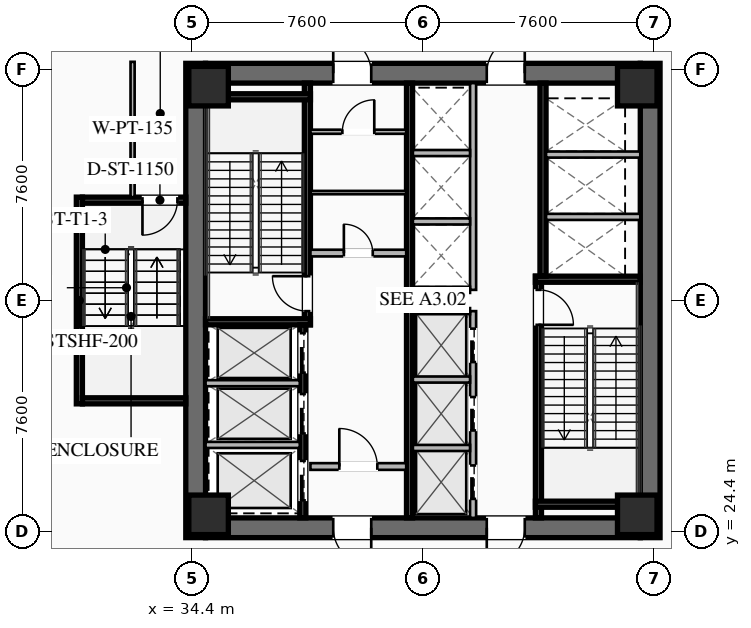
"""IFC4 building model, lengths in metres.
Left out: names, types, materials, properties, quantities, classifications, styles, units other than length and angle.
Written with IfcOpenShell. Run it as: python <this file> out.ifc"""

import sys

from ifc_helpers import new_model, si_unit, direction, frame, frame_2d, origin, origin_2d, place, context, subcontext, project, spatial, rectangle, hollow_rectangle, extrude, element, fill, save


model = new_model("IFC4")
c1 = context("Model", 3, precision=1e-05, world=origin(), true_north=direction((0.0, 1.0)))
c2 = subcontext(c1, "Body", "Model", "MODEL_VIEW")
j1 = project(units=[si_unit("LENGTHUNIT", "METRE"), si_unit("PLANEANGLEUNIT", "RADIAN")], contexts=[c1])
p1 = place(None, origin())
s1 = spatial("IfcSite", under=j1, at=p1, CompositionType="ELEMENT")
p2 = place(p1, origin())
s2 = spatial("IfcBuilding", under=s1, at=p2, CompositionType="ELEMENT")
p3 = place(p2, frame((0.0, 0.0, 10.2)))
s3 = spatial("IfcBuildingStorey", under=s2, at=p3, CompositionType="ELEMENT", Elevation=10.2)
for number, where, z_axis, x_axis in (
    (1, (34.525, 24.2, 0.0), (0.0, 0.0, 1.0), (0.0, 1.0, 0.0)),
    (2, (49.475, 39.8, 0.0), (0.0, 0.0, 1.0), (0.0, -1.0, 0.0)),
):
    element("IfcWall", number, at=place(p3, frame(where, z_axis=z_axis, x_axis=x_axis)), inside=s3, PredefinedType="SHEAR", context=c2, shape_type="SweptSolid", body=[
        extrude(rectangle(XDim=15.6, YDim=0.65, at=frame_2d((7.8, 0.0))), origin(), (0.0, 0.0, 1.0), 5.4),
    ])
p4 = place(p3, frame((49.15, 24.525, 0.0), z_axis=(0.0, 0.0, 1.0), x_axis=(-1.0, 0.0, 0.0)))
e3 = element("IfcWall", 3, at=p4, inside=s3, PredefinedType="SHEAR", context=c2, shape_type="SweptSolid", body=[
    extrude(rectangle(XDim=14.3, YDim=0.65, at=frame_2d((7.15, 0.0))), origin(), (0.0, 0.0, 1.0), 5.4),
])
p5 = place(p4, frame((8.85, 0.0, 0.0)))
e4 = element("IfcOpeningElement", 4, at=p5, cuts=e3, PredefinedType="OPENING", context=c2, shape_type="SweptSolid", body=[
    extrude(rectangle(XDim=1.25, YDim=2.25, at=frame_2d((0.625, 1.125))), frame((0.0, 0.335, 0.0), z_axis=(0.0, -1.0, 0.0), x_axis=(1.0, 0.0, 0.0)), (0.0, 0.0, 1.0), 0.67),
])
p6 = place(p4, frame((3.8, 0.0, 0.0)))
e5 = element("IfcOpeningElement", 5, at=p6, cuts=e3, PredefinedType="OPENING", context=c2, shape_type="SweptSolid", body=[
    extrude(rectangle(XDim=1.25, YDim=2.25, at=frame_2d((0.625, 1.125))), frame((0.0, 0.335, 0.0), z_axis=(0.0, -1.0, 0.0), x_axis=(1.0, 0.0, 0.0)), (0.0, 0.0, 1.0), 0.67),
])
p7 = place(p3, frame((34.85, 39.475, 0.0), z_axis=(0.0, 0.0, 1.0), x_axis=(1.0, 0.0, 0.0)))
e6 = element("IfcWall", 6, at=p7, inside=s3, PredefinedType="SHEAR", context=c2, shape_type="SweptSolid", body=[
    extrude(rectangle(XDim=14.3, YDim=0.65, at=frame_2d((7.15, 0.0))), origin(), (0.0, 0.0, 1.0), 5.4),
])
p8 = place(p7, frame((4.2, 0.0, 0.0)))
e7 = element("IfcOpeningElement", 7, at=p8, cuts=e6, PredefinedType="OPENING", context=c2, shape_type="SweptSolid", body=[
    extrude(rectangle(XDim=1.25, YDim=2.25, at=frame_2d((0.625, 1.125))), frame((0.0, 0.335, 0.0), z_axis=(0.0, -1.0, 0.0), x_axis=(1.0, 0.0, 0.0)), (0.0, 0.0, 1.0), 0.67),
])
p9 = place(p7, frame((9.25, 0.0, 0.0)))
e8 = element("IfcOpeningElement", 8, at=p9, cuts=e6, PredefinedType="OPENING", context=c2, shape_type="SweptSolid", body=[
    extrude(rectangle(XDim=1.25, YDim=2.25, at=frame_2d((0.625, 1.125))), frame((0.0, 0.335, 0.0), z_axis=(0.0, -1.0, 0.0), x_axis=(1.0, 0.0, 0.0)), (0.0, 0.0, 1.0), 0.67),
])
for number, where, z_axis, x_axis in (
    (9, (34.95, 24.95, 0.0), (0.0, 0.0, 1.0), (1.0, 0.0, 0.0)),
    (10, (49.05, 24.95, 0.0), (0.0, 0.0, 1.0), (1.0, 0.0, 0.0)),
    (11, (49.05, 39.05, 0.0), (0.0, 0.0, 1.0), (1.0, 0.0, 0.0)),
    (12, (34.95, 39.05, 0.0), (0.0, 0.0, 1.0), (1.0, 0.0, 0.0)),
):
    element("IfcColumn", number, at=place(p3, frame(where, z_axis=z_axis, x_axis=x_axis)), inside=s3, PredefinedType="COLUMN", context=c2, shape_type="SweptSolid", body=[
        extrude(hollow_rectangle(XDim=1.3, YDim=1.3, WallThickness=0.05, at=origin_2d()), origin(), (0.0, 0.0, 1.0), 5.14),
    ])
p10 = place(p3, frame((38.2, 31.2, 0.0), z_axis=(0.0, 0.0, 1.0), x_axis=(0.0, 1.0, 0.0)))
e13 = element("IfcWall", 13, at=p10, inside=s3, PredefinedType="SHEAR", context=c2, shape_type="SweptSolid", body=[
    extrude(rectangle(XDim=7.95, YDim=0.2, at=frame_2d((3.975, 0.0))), origin(), (0.0, 0.0, 1.0), 5.14),
])
p11 = place(p10, frame((0.45, 0.0, 0.0)))
e14 = element("IfcOpeningElement", 14, at=p11, cuts=e13, PredefinedType="OPENING", context=c2, shape_type="SweptSolid", body=[
    extrude(rectangle(XDim=1.15, YDim=2.2, at=frame_2d((0.575, 1.1))), frame((0.0, 0.11, 0.0), z_axis=(0.0, -1.0, 0.0), x_axis=(1.0, 0.0, 0.0)), (0.0, 0.0, 1.0), 0.22),
])
for number, where, z_axis, x_axis in (
    (15, (34.85, 31.3, 0.0), (0.0, 0.0, 1.0), (1.0, 0.0, 0.0)),
    (16, (34.85, 38.7, 0.0), (0.0, 0.0, 1.0), (1.0, 0.0, 0.0)),
):
    element("IfcWall", number, at=place(p3, frame(where, z_axis=z_axis, x_axis=x_axis)), inside=s3, PredefinedType="SHEAR", context=c2, shape_type="SweptSolid", body=[
        extrude(rectangle(XDim=3.45, YDim=0.2, at=frame_2d((1.725, 0.0))), origin(), (0.0, 0.0, 1.0), 5.14),
    ])
p12 = place(p3, frame((45.8, 32.8, 0.0), z_axis=(0.0, 0.0, 1.0), x_axis=(0.0, -1.0, 0.0)))
e17 = element("IfcWall", 17, at=p12, inside=s3, PredefinedType="SHEAR", context=c2, shape_type="SweptSolid", body=[
    extrude(rectangle(XDim=7.95, YDim=0.2, at=frame_2d((3.975, 0.0))), origin(), (0.0, 0.0, 1.0), 5.14),
])
p13 = place(p12, frame((0.45, 0.0, 0.0)))
e18 = element("IfcOpeningElement", 18, at=p13, cuts=e17, PredefinedType="OPENING", context=c2, shape_type="SweptSolid", body=[
    extrude(rectangle(XDim=1.15, YDim=2.2, at=frame_2d((0.575, 1.1))), frame((0.0, 0.11, 0.0), z_axis=(0.0, -1.0, 0.0), x_axis=(1.0, 0.0, 0.0)), (0.0, 0.0, 1.0), 0.22),
])
for number, where, z_axis, x_axis in (
    (19, (45.7, 32.7, 0.0), (0.0, 0.0, 1.0), (1.0, 0.0, 0.0)),
    (20, (45.7, 25.3, 0.0), (0.0, 0.0, 1.0), (1.0, 0.0, 0.0)),
):
    element("IfcWall", number, at=place(p3, frame(where, z_axis=z_axis, x_axis=x_axis)), inside=s3, PredefinedType="SHEAR", context=c2, shape_type="SweptSolid", body=[
        extrude(rectangle(XDim=3.45, YDim=0.2, at=frame_2d((1.725, 0.0))), origin(), (0.0, 0.0, 1.0), 5.14),
    ])
p14 = place(p3, frame((41.56, 24.85, 0.0), z_axis=(0.0, 0.0, 1.0), x_axis=(0.0, 1.0, 0.0)))
e21 = element("IfcWall", 21, at=p14, inside=s3, PredefinedType="SHEAR", context=c2, shape_type="SweptSolid", body=[
    extrude(rectangle(XDim=14.3, YDim=0.2, at=frame_2d((7.15, 0.0))), origin(), (0.0, 0.0, 1.0), 5.14),
])
p15 = place(p3, frame((38.3, 33.56, 0.0), z_axis=(0.0, 0.0, 1.0), x_axis=(1.0, 0.0, 0.0)))
e22 = element("IfcWall", 22, at=p15, inside=s3, PredefinedType="SOLIDWALL", context=c2, shape_type="SweptSolid", body=[
    extrude(rectangle(XDim=3.15, YDim=0.22, at=frame_2d((1.575, 0.0))), origin(), (0.0, 0.0, 1.0), 2.71),
])
p16 = place(p15, frame((1.1, 0.0, 0.0)))
e23 = element("IfcOpeningElement", 23, at=p16, cuts=e22, PredefinedType="OPENING", context=c2, shape_type="SweptSolid", body=[
    extrude(rectangle(XDim=0.95, YDim=2.05, at=frame_2d((0.475, 1.025))), frame((0.0, 0.12, 0.0), z_axis=(0.0, -1.0, 0.0), x_axis=(1.0, 0.0, 0.0)), (0.0, 0.0, 1.0), 0.24),
])
p17 = place(p3, frame((38.3, 26.54, 0.0), z_axis=(0.0, 0.0, 1.0), x_axis=(1.0, 0.0, 0.0)))
e24 = element("IfcWall", 24, at=p17, inside=s3, PredefinedType="SOLIDWALL", context=c2, shape_type="SweptSolid", body=[
    extrude(rectangle(XDim=3.15, YDim=0.22, at=frame_2d((1.575, 0.0))), origin(), (0.0, 0.0, 1.0), 2.71),
])
p18 = place(p17, frame((0.95, 0.0, 0.0)))
e25 = element("IfcOpeningElement", 25, at=p18, cuts=e24, PredefinedType="OPENING", context=c2, shape_type="SweptSolid", body=[
    extrude(rectangle(XDim=1.25, YDim=2.25, at=frame_2d((0.625, 1.125))), frame((0.0, 0.12, 0.0), z_axis=(0.0, -1.0, 0.0), x_axis=(1.0, 0.0, 0.0)), (0.0, 0.0, 1.0), 0.24),
])
p19 = place(p3, frame((38.05, 24.85, 0.0), z_axis=(0.0, 0.0, 1.0), x_axis=(0.0, 1.0, 0.0)))
e26 = element("IfcWall", 26, at=p19, inside=s3, PredefinedType="SHEAR", context=c2, shape_type="SweptSolid", body=[
    extrude(rectangle(XDim=6.35, YDim=0.2, at=frame_2d((3.175, 0.0))), origin(), (0.0, 0.0, 1.0), 5.14),
])
p20 = place(p19, frame((4.775, 0.0, 0.0)))
e27 = element("IfcOpeningElement", 27, at=p20, cuts=e26, PredefinedType="OPENING", context=c2, shape_type="SweptSolid", body=[
    extrude(rectangle(XDim=1.3, YDim=2.25, at=frame_2d((0.65, 1.125))), frame((0.0, 0.11, 0.0), z_axis=(0.0, -1.0, 0.0), x_axis=(1.0, 0.0, 0.0)), (0.0, 0.0, 1.0), 0.22),
])
p21 = place(p19, frame((2.775, 0.0, 0.0)))
e28 = element("IfcOpeningElement", 28, at=p21, cuts=e26, PredefinedType="OPENING", context=c2, shape_type="SweptSolid", body=[
    extrude(rectangle(XDim=1.3, YDim=2.25, at=frame_2d((0.65, 1.125))), frame((0.0, 0.11, 0.0), z_axis=(0.0, -1.0, 0.0), x_axis=(1.0, 0.0, 0.0)), (0.0, 0.0, 1.0), 0.22),
])
p22 = place(p19, frame((0.575, 0.0, 0.0)))
e29 = element("IfcOpeningElement", 29, at=p22, cuts=e26, PredefinedType="OPENING", context=c2, shape_type="SweptSolid", body=[
    extrude(rectangle(XDim=1.3, YDim=2.25, at=frame_2d((0.65, 1.125))), frame((0.0, 0.11, 0.0), z_axis=(0.0, -1.0, 0.0), x_axis=(1.0, 0.0, 0.0)), (0.0, 0.0, 1.0), 0.22),
])
for number, where, z_axis, x_axis in (
    (30, (34.85, 27.25, 0.0), (0.0, 0.0, 1.0), (1.0, 0.0, 0.0)),
    (31, (34.85, 29.28, 0.0), (0.0, 0.0, 1.0), (1.0, 0.0, 0.0)),
):
    element("IfcWall", number, at=place(p3, frame(where, z_axis=z_axis, x_axis=x_axis)), inside=s3, PredefinedType="SOLIDWALL", context=c2, shape_type="SweptSolid", body=[
        extrude(rectangle(XDim=3.1, YDim=0.2, at=frame_2d((1.55, 0.0))), origin(), (0.0, 0.0, 1.0), 5.14),
    ])
p23 = place(p3, frame((45.95, 39.15, 0.0), z_axis=(0.0, 0.0, 1.0), x_axis=(0.0, -1.0, 0.0)))
e32 = element("IfcWall", 32, at=p23, inside=s3, PredefinedType="SHEAR", context=c2, shape_type="SweptSolid", body=[
    extrude(rectangle(XDim=6.35, YDim=0.2, at=frame_2d((3.175, 0.0))), origin(), (0.0, 0.0, 1.0), 5.14),
])
for number, where, z_axis, x_axis in (
    (33, (46.05, 34.75, 0.0), (0.0, 0.0, 1.0), (1.0, 0.0, 0.0)),
    (34, (46.05, 36.8, 0.0), (0.0, 0.0, 1.0), (1.0, 0.0, 0.0)),
):
    element("IfcWall", number, at=place(p3, frame(where, z_axis=z_axis, x_axis=x_axis)), inside=s3, PredefinedType="SOLIDWALL", context=c2, shape_type="SweptSolid", body=[
        extrude(rectangle(XDim=3.1, YDim=0.2, at=frame_2d((1.55, 0.0))), origin(), (0.0, 0.0, 1.0), 5.14),
    ])
p24 = place(p3, frame((38.3, 37.55, 0.0), z_axis=(0.0, 0.0, 1.0), x_axis=(1.0, 0.0, 0.0)))
e35 = element("IfcWall", 35, at=p24, inside=s3, PredefinedType="PARTITIONING", context=c2, shape_type="SweptSolid", body=[
    extrude(rectangle(XDim=3.15, YDim=0.135, at=frame_2d((1.575, 0.0))), origin(), (0.0, 0.0, 1.0), 2.71),
])
p25 = place(p24, frame((1.05, 0.0, 0.0)))
e36 = element("IfcOpeningElement", 36, at=p25, cuts=e35, PredefinedType="OPENING", context=c2, shape_type="SweptSolid", body=[
    extrude(rectangle(XDim=1.05, YDim=2.2, at=frame_2d((0.525, 1.1))), frame((0.0, 0.077, 0.0), z_axis=(0.0, -1.0, 0.0), x_axis=(1.0, 0.0, 0.0)), (0.0, 0.0, 1.0), 0.155),
])
p26 = place(p3, frame((38.3, 35.55, 0.0), z_axis=(0.0, 0.0, 1.0), x_axis=(1.0, 0.0, 0.0)))
e37 = element("IfcWall", 37, at=p26, inside=s3, PredefinedType="PARTITIONING", context=c2, shape_type="SweptSolid", body=[
    extrude(rectangle(XDim=3.15, YDim=0.11, at=frame_2d((1.575, 0.0))), origin(), (0.0, 0.0, 1.0), 2.71),
])
p27 = place(p3, frame((43.65, 24.85, 0.0), z_axis=(0.0, 0.0, 1.0), x_axis=(0.0, 1.0, 0.0)))
e38 = element("IfcWall", 38, at=p27, inside=s3, PredefinedType="SOLIDWALL", context=c2, shape_type="SweptSolid", body=[
    extrude(rectangle(XDim=6.8, YDim=0.2, at=frame_2d((3.4, 0.0))), origin(), (0.0, 0.0, 1.0), 5.14),
])
p28 = place(p27, frame((0.625, 0.0, 0.0)))
e39 = element("IfcOpeningElement", 39, at=p28, cuts=e38, PredefinedType="OPENING", context=c2, shape_type="SweptSolid", body=[
    extrude(rectangle(XDim=1.1, YDim=2.2, at=frame_2d((0.55, 1.1))), frame((0.0, 0.11, 0.0), z_axis=(0.0, -1.0, 0.0), x_axis=(1.0, 0.0, 0.0)), (0.0, 0.0, 1.0), 0.22),
])
p29 = place(p27, frame((2.875, 0.0, 0.0)))
e40 = element("IfcOpeningElement", 40, at=p29, cuts=e38, PredefinedType="OPENING", context=c2, shape_type="SweptSolid", body=[
    extrude(rectangle(XDim=1.1, YDim=2.2, at=frame_2d((0.55, 1.1))), frame((0.0, 0.11, 0.0), z_axis=(0.0, -1.0, 0.0), x_axis=(1.0, 0.0, 0.0)), (0.0, 0.0, 1.0), 0.22),
])
p30 = place(p27, frame((5.125, 0.0, 0.0)))
e41 = element("IfcOpeningElement", 41, at=p30, cuts=e38, PredefinedType="OPENING", context=c2, shape_type="SweptSolid", body=[
    extrude(rectangle(XDim=1.1, YDim=2.2, at=frame_2d((0.55, 1.1))), frame((0.0, 0.11, 0.0), z_axis=(0.0, -1.0, 0.0), x_axis=(1.0, 0.0, 0.0)), (0.0, 0.0, 1.0), 0.22),
])
for number, where, z_axis, x_axis in (
    (42, (41.67, 27.15, 0.0), (0.0, 0.0, 1.0), (1.0, 0.0, 0.0)),
    (43, (41.67, 29.4, 0.0), (0.0, 0.0, 1.0), (1.0, 0.0, 0.0)),
    (44, (41.67, 31.65, 0.0), (0.0, 0.0, 1.0), (1.0, 0.0, 0.0)),
):
    element("IfcWall", number, at=place(p3, frame(where, z_axis=z_axis, x_axis=x_axis)), inside=s3, PredefinedType="SOLIDWALL", context=c2, shape_type="SweptSolid", body=[
        extrude(rectangle(XDim=1.88, YDim=0.2, at=frame_2d((0.94, 0.0))), origin(), (0.0, 0.0, 1.0), 5.14),
    ])
p31 = place(p3, frame((43.65, 32.35, 0.0), z_axis=(0.0, 0.0, 1.0), x_axis=(0.0, 1.0, 0.0)))
e45 = element("IfcWall", 45, at=p31, inside=s3, PredefinedType="SOLIDWALL", context=c2, shape_type="SweptSolid", body=[
    extrude(rectangle(XDim=6.8, YDim=0.2, at=frame_2d((3.4, 0.0))), origin(), (0.0, 0.0, 1.0), 5.14),
])
for number, where, z_axis, x_axis in (
    (46, (41.67, 32.35, 0.0), (0.0, 0.0, 1.0), (1.0, 0.0, 0.0)),
    (47, (41.67, 34.6, 0.0), (0.0, 0.0, 1.0), (1.0, 0.0, 0.0)),
    (48, (41.67, 36.85, 0.0), (0.0, 0.0, 1.0), (1.0, 0.0, 0.0)),
):
    element("IfcWall", number, at=place(p3, frame(where, z_axis=z_axis, x_axis=x_axis)), inside=s3, PredefinedType="SOLIDWALL", context=c2, shape_type="SweptSolid", body=[
        extrude(rectangle(XDim=1.88, YDim=0.2, at=frame_2d((0.94, 0.0))), origin(), (0.0, 0.0, 1.0), 5.14),
    ])
p32 = place(p3, frame((30.7, 28.6, 0.0), z_axis=(0.0, 0.0, 1.0), x_axis=(0.0, 1.0, 0.0)))
e49 = element("IfcWall", 49, at=p32, inside=s3, PredefinedType="SHEAR", context=c2, shape_type="SweptSolid", body=[
    extrude(rectangle(XDim=6.8, YDim=0.2, at=frame_2d((3.4, 0.0))), origin(), (0.0, 0.0, 1.0), 5.14),
])
p33 = place(p3, frame((34.2, 35.3, 0.0), z_axis=(0.0, 0.0, 1.0), x_axis=(-1.0, 0.0, 0.0)))
e50 = element("IfcWall", 50, at=p33, inside=s3, PredefinedType="SHEAR", context=c2, shape_type="SweptSolid", body=[
    extrude(rectangle(XDim=3.4, YDim=0.2, at=frame_2d((1.7, 0.0))), origin(), (0.0, 0.0, 1.0), 5.14),
])
p34 = place(p33, frame((0.275, 0.0, 0.0)))
e51 = element("IfcOpeningElement", 51, at=p34, cuts=e50, PredefinedType="OPENING", context=c2, shape_type="SweptSolid", body=[
    extrude(rectangle(XDim=1.15, YDim=2.2, at=frame_2d((0.575, 1.1))), frame((0.0, 0.11, 0.0), z_axis=(0.0, -1.0, 0.0), x_axis=(1.0, 0.0, 0.0)), (0.0, 0.0, 1.0), 0.22),
])
p35 = place(p3, frame((30.8, 28.7, 0.0), z_axis=(0.0, 0.0, 1.0), x_axis=(1.0, 0.0, 0.0)))
e52 = element("IfcWall", 52, at=p35, inside=s3, PredefinedType="SHEAR", context=c2, shape_type="SweptSolid", body=[
    extrude(rectangle(XDim=3.4, YDim=0.2, at=frame_2d((1.7, 0.0))), origin(), (0.0, 0.0, 1.0), 5.14),
])
p36 = place(p3, frame((32.45, 35.4, 0.0), z_axis=(0.0, 0.0, 1.0), x_axis=(0.0, 1.0, 0.0)))
e53 = element("IfcWall", 53, at=p36, inside=s3, PredefinedType="PARTITIONING", context=c2, shape_type="SweptSolid", body=[
    extrude(rectangle(XDim=4.45, YDim=0.135, at=frame_2d((2.225, 0.0))), origin(), (0.0, 0.0, 1.0), 2.71),
])
p37 = place(p8, origin())
e54 = element("IfcDoor", 54, at=p37, inside=s3, OperationType="SINGLE_SWING_LEFT", PredefinedType="DOOR", context=c2, shape_type="SweptSolid", body=[
    extrude(rectangle(XDim=1.25, YDim=2.25, at=frame_2d((0.625, 1.125))), frame((0.0, 0.025, 0.0), z_axis=(0.0, -1.0, 0.0), x_axis=(1.0, 0.0, 0.0)), (0.0, 0.0, 1.0), 0.05),
])
fill(e7, e54)
p38 = place(p9, origin())
e55 = element("IfcDoor", 55, at=p38, inside=s3, OperationType="SINGLE_SWING_RIGHT", PredefinedType="DOOR", context=c2, shape_type="SweptSolid", body=[
    extrude(rectangle(XDim=1.25, YDim=2.25, at=frame_2d((0.625, 1.125))), frame((0.0, 0.025, 0.0), z_axis=(0.0, -1.0, 0.0), x_axis=(1.0, 0.0, 0.0)), (0.0, 0.0, 1.0), 0.05),
])
fill(e8, e55)
p39 = place(p5, origin())
e56 = element("IfcDoor", 56, at=p39, inside=s3, OperationType="SINGLE_SWING_LEFT", PredefinedType="DOOR", context=c2, shape_type="SweptSolid", body=[
    extrude(rectangle(XDim=1.25, YDim=2.25, at=frame_2d((0.625, 1.125))), frame((0.0, 0.025, 0.0), z_axis=(0.0, -1.0, 0.0), x_axis=(1.0, 0.0, 0.0)), (0.0, 0.0, 1.0), 0.05),
])
fill(e4, e56)
p40 = place(p6, origin())
e57 = element("IfcDoor", 57, at=p40, inside=s3, OperationType="SINGLE_SWING_RIGHT", PredefinedType="DOOR", context=c2, shape_type="SweptSolid", body=[
    extrude(rectangle(XDim=1.25, YDim=2.25, at=frame_2d((0.625, 1.125))), frame((0.0, 0.025, 0.0), z_axis=(0.0, -1.0, 0.0), x_axis=(1.0, 0.0, 0.0)), (0.0, 0.0, 1.0), 0.05),
])
fill(e5, e57)
p41 = place(p11, origin())
e58 = element("IfcDoor", 58, at=p41, inside=s3, OperationType="SINGLE_SWING_RIGHT", PredefinedType="DOOR", context=c2, shape_type="SweptSolid", body=[
    extrude(rectangle(XDim=1.15, YDim=2.2, at=frame_2d((0.575, 1.1))), frame((0.0, 0.025, 0.0), z_axis=(0.0, -1.0, 0.0), x_axis=(1.0, 0.0, 0.0)), (0.0, 0.0, 1.0), 0.05),
])
fill(e14, e58)
p42 = place(p13, origin())
e59 = element("IfcDoor", 59, at=p42, inside=s3, OperationType="SINGLE_SWING_RIGHT", PredefinedType="DOOR", context=c2, shape_type="SweptSolid", body=[
    extrude(rectangle(XDim=1.15, YDim=2.2, at=frame_2d((0.575, 1.1))), frame((0.0, 0.025, 0.0), z_axis=(0.0, -1.0, 0.0), x_axis=(1.0, 0.0, 0.0)), (0.0, 0.0, 1.0), 0.05),
])
fill(e18, e59)
p43 = place(p18, origin())
e60 = element("IfcDoor", 60, at=p43, inside=s3, OperationType="SINGLE_SWING_LEFT", PredefinedType="DOOR", context=c2, shape_type="SweptSolid", body=[
    extrude(rectangle(XDim=1.25, YDim=2.25, at=frame_2d((0.625, 1.125))), frame((0.0, 0.025, 0.0), z_axis=(0.0, -1.0, 0.0), x_axis=(1.0, 0.0, 0.0)), (0.0, 0.0, 1.0), 0.05),
])
fill(e25, e60)
p44 = place(p25, origin())
e61 = element("IfcDoor", 61, at=p44, inside=s3, OperationType="SINGLE_SWING_RIGHT", PredefinedType="DOOR", context=c2, shape_type="SweptSolid", body=[
    extrude(rectangle(XDim=1.05, YDim=2.2, at=frame_2d((0.525, 1.1))), frame((0.0, 0.025, 0.0), z_axis=(0.0, -1.0, 0.0), x_axis=(1.0, 0.0, 0.0)), (0.0, 0.0, 1.0), 0.05),
])
fill(e36, e61)
p45 = place(p16, origin())
e62 = element("IfcDoor", 62, at=p45, inside=s3, OperationType="SINGLE_SWING_LEFT", PredefinedType="DOOR", context=c2, shape_type="SweptSolid", body=[
    extrude(rectangle(XDim=0.95, YDim=2.05, at=frame_2d((0.475, 1.025))), frame((0.0, 0.025, 0.0), z_axis=(0.0, -1.0, 0.0), x_axis=(1.0, 0.0, 0.0)), (0.0, 0.0, 1.0), 0.05),
])
fill(e23, e62)
p46 = place(p34, origin())
e63 = element("IfcDoor", 63, at=p46, inside=s3, OperationType="SINGLE_SWING_RIGHT", PredefinedType="DOOR", context=c2, shape_type="SweptSolid", body=[
    extrude(rectangle(XDim=1.15, YDim=2.2, at=frame_2d((0.575, 1.1))), frame((0.0, 0.025, 0.0), z_axis=(0.0, -1.0, 0.0), x_axis=(1.0, 0.0, 0.0)), (0.0, 0.0, 1.0), 0.05),
])
fill(e51, e63)
p47 = place(p20, origin())
e64 = element("IfcDoor", 64, at=p47, inside=s3, OperationType="SLIDING_TO_LEFT", PredefinedType="DOOR", context=c2, shape_type="SweptSolid", body=[
    extrude(rectangle(XDim=1.3, YDim=2.25, at=frame_2d((0.65, 1.125))), frame((0.0, 0.025, 0.0), z_axis=(0.0, -1.0, 0.0), x_axis=(1.0, 0.0, 0.0)), (0.0, 0.0, 1.0), 0.05),
])
fill(e27, e64)
p48 = place(p21, origin())
e65 = element("IfcDoor", 65, at=p48, inside=s3, OperationType="SLIDING_TO_LEFT", PredefinedType="DOOR", context=c2, shape_type="SweptSolid", body=[
    extrude(rectangle(XDim=1.3, YDim=2.25, at=frame_2d((0.65, 1.125))), frame((0.0, 0.025, 0.0), z_axis=(0.0, -1.0, 0.0), x_axis=(1.0, 0.0, 0.0)), (0.0, 0.0, 1.0), 0.05),
])
fill(e28, e65)
p49 = place(p22, origin())
e66 = element("IfcDoor", 66, at=p49, inside=s3, OperationType="SLIDING_TO_LEFT", PredefinedType="DOOR", context=c2, shape_type="SweptSolid", body=[
    extrude(rectangle(XDim=1.3, YDim=2.25, at=frame_2d((0.65, 1.125))), frame((0.0, 0.025, 0.0), z_axis=(0.0, -1.0, 0.0), x_axis=(1.0, 0.0, 0.0)), (0.0, 0.0, 1.0), 0.05),
])
fill(e29, e66)
p50 = place(p28, origin())
e67 = element("IfcDoor", 67, at=p50, inside=s3, OperationType="SLIDING_TO_LEFT", PredefinedType="DOOR", context=c2, shape_type="SweptSolid", body=[
    extrude(rectangle(XDim=1.1, YDim=2.2, at=frame_2d((0.55, 1.1))), frame((0.0, 0.025, 0.0), z_axis=(0.0, -1.0, 0.0), x_axis=(1.0, 0.0, 0.0)), (0.0, 0.0, 1.0), 0.05),
])
fill(e39, e67)
p51 = place(p29, origin())
e68 = element("IfcDoor", 68, at=p51, inside=s3, OperationType="SLIDING_TO_LEFT", PredefinedType="DOOR", context=c2, shape_type="SweptSolid", body=[
    extrude(rectangle(XDim=1.1, YDim=2.2, at=frame_2d((0.55, 1.1))), frame((0.0, 0.025, 0.0), z_axis=(0.0, -1.0, 0.0), x_axis=(1.0, 0.0, 0.0)), (0.0, 0.0, 1.0), 0.05),
])
fill(e40, e68)
p52 = place(p30, origin())
e69 = element("IfcDoor", 69, at=p52, inside=s3, OperationType="SLIDING_TO_LEFT", PredefinedType="DOOR", context=c2, shape_type="SweptSolid", body=[
    extrude(rectangle(XDim=1.1, YDim=2.2, at=frame_2d((0.55, 1.1))), frame((0.0, 0.025, 0.0), z_axis=(0.0, -1.0, 0.0), x_axis=(1.0, 0.0, 0.0)), (0.0, 0.0, 1.0), 0.05),
])
fill(e41, e69)
save(model, sys.argv[1])
